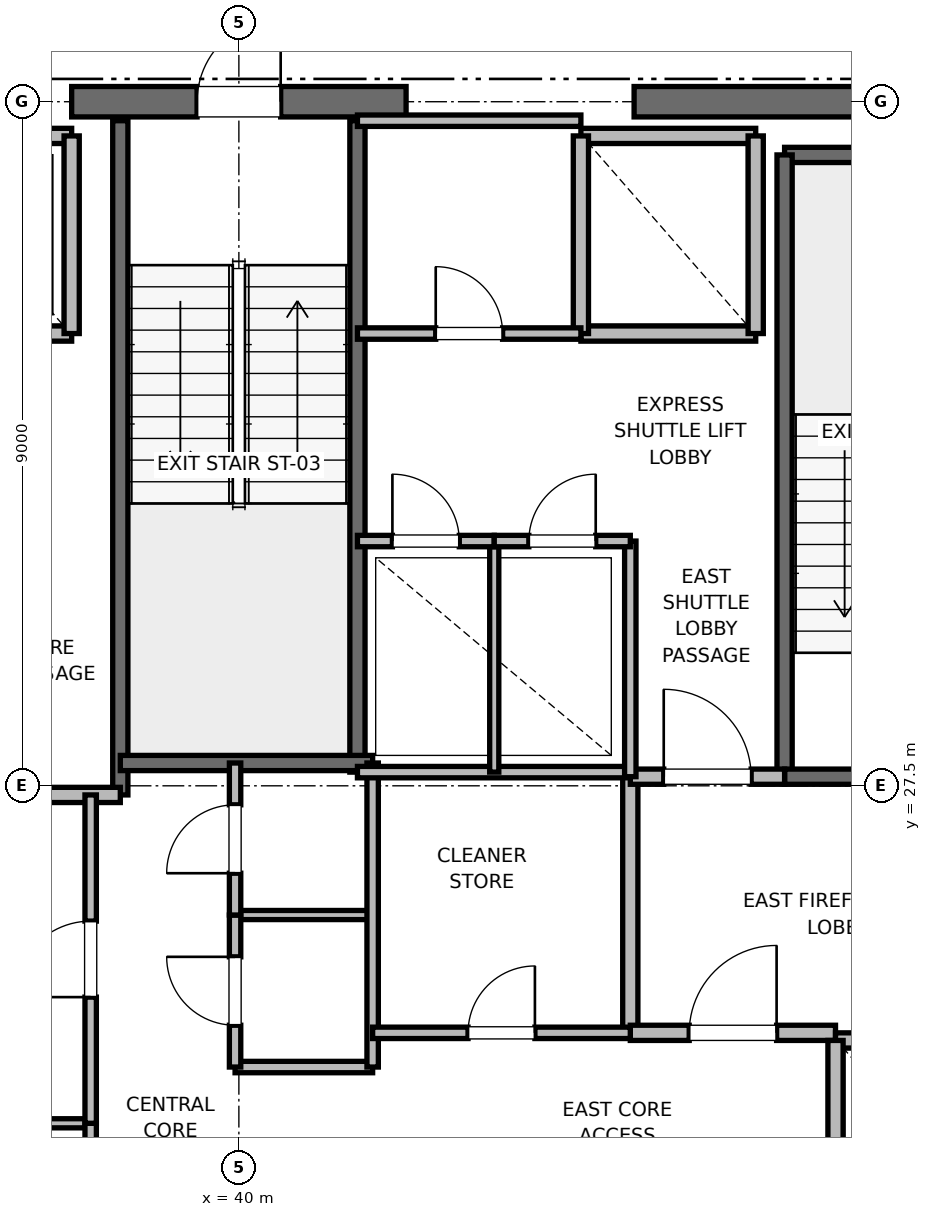
"""IFC4 building model, lengths in metres.
Left out: names, types, materials, properties, quantities, classifications, styles, units other than length and angle.
Written with IfcOpenShell. Run it as: python <this file> out.ifc"""

import sys

from ifc_helpers import new_model, si_unit, direction, frame, frame_2d, origin, place, context, subcontext, project, spatial, rectangle, extrude, element, fill, save


model = new_model("IFC4")
c1 = context("Model", 3, precision=1e-05, world=origin(), true_north=direction((0.0, 1.0)))
c2 = subcontext(c1, "Body", "Model", "MODEL_VIEW")
j1 = project(units=[si_unit("LENGTHUNIT", "METRE"), si_unit("PLANEANGLEUNIT", "RADIAN")], contexts=[c1])
p1 = place(None, origin())
s1 = spatial("IfcSite", under=j1, at=p1, CompositionType="ELEMENT")
p2 = place(p1, origin())
s2 = spatial("IfcBuilding", under=s1, at=p2, CompositionType="ELEMENT")
p3 = place(p2, frame((0.0, 0.0, 338.8)))
s3 = spatial("IfcBuildingStorey", under=s2, at=p3, CompositionType="ELEMENT", Elevation=338.8)
p4 = place(p3, frame((37.8, 36.5, 0.0), z_axis=(0.0, 0.0, 1.0), x_axis=(1.0, 0.0, 0.0)))
e1 = element("IfcWall", 1, at=p4, inside=s3, PredefinedType="SHEAR", context=c2, shape_type="SweptSolid", body=[
    extrude(rectangle(XDim=4.4, YDim=0.4, at=frame_2d((2.2, 0.0))), origin(), (0.0, 0.0, 1.0), 3.7),
])
p5 = place(p4, frame((1.65, 0.0, 0.0)))
e2 = element("IfcOpeningElement", 2, at=p5, cuts=e1, PredefinedType="OPENING", context=c2, shape_type="SweptSolid", body=[
    extrude(rectangle(XDim=1.1, YDim=2.15, at=frame_2d((0.55, 1.075))), frame((0.0, 0.2, 0.0), z_axis=(0.0, -1.0, 0.0), x_axis=(1.0, 0.0, 0.0)), (0.0, 0.0, 1.0), 0.4),
])
p6 = place(p3, frame((45.2, 36.5, 0.0), z_axis=(0.0, 0.0, 1.0), x_axis=(1.0, 0.0, 0.0)))
e3 = element("IfcWall", 3, at=p6, inside=s3, PredefinedType="SHEAR", context=c2, shape_type="SweptSolid", body=[
    extrude(rectangle(XDim=5.8, YDim=0.4, at=frame_2d((2.9, 0.0))), origin(), (0.0, 0.0, 1.0), 3.7),
])
p7 = place(p3, frame((47.18, 35.8, 0.0), z_axis=(0.0, 0.0, 1.0), x_axis=(1.0, 0.0, 0.0)))
e4 = element("IfcWall", 4, at=p7, inside=s3, PredefinedType="SOLIDWALL", context=c2, shape_type="SweptSolid", body=[
    extrude(rectangle(XDim=3.12, YDim=0.2, at=frame_2d((1.56, 0.0))), origin(), (0.0, 0.0, 1.0), 3.7),
])
p8 = place(p3, frame((47.18, 27.62, 0.0), z_axis=(0.0, 0.0, 1.0), x_axis=(0.0, 1.0, 0.0)))
e5 = element("IfcWall", 5, at=p8, inside=s3, PredefinedType="SOLIDWALL", context=c2, shape_type="SweptSolid", body=[
    extrude(rectangle(XDim=8.18, YDim=0.2, at=frame_2d((4.09, 0.0))), origin(), (0.0, 0.0, 1.0), 3.7),
])
p9 = place(p3, frame((47.18, 27.62, 0.0), z_axis=(0.0, 0.0, 1.0), x_axis=(1.0, 0.0, 0.0)))
e6 = element("IfcWall", 6, at=p9, inside=s3, PredefinedType="SOLIDWALL", context=c2, shape_type="SweptSolid", body=[
    extrude(rectangle(XDim=3.12, YDim=0.2, at=frame_2d((1.56, 0.0))), origin(), (0.0, 0.0, 1.0), 3.7),
])
p10 = place(p9, frame((1.01, 0.0, 0.0)))
e7 = element("IfcOpeningElement", 7, at=p10, cuts=e6, PredefinedType="OPENING", context=c2, shape_type="SweptSolid", body=[
    extrude(rectangle(XDim=1.1, YDim=2.15, at=frame_2d((0.55, 1.075))), frame((0.0, 0.1, 0.0), z_axis=(0.0, -1.0, 0.0), x_axis=(1.0, 0.0, 0.0)), (0.0, 0.0, 1.0), 0.2),
])
p11 = place(p3, frame((38.44, 27.38, 0.0), z_axis=(0.0, 0.0, 1.0), x_axis=(0.0, 1.0, 0.0)))
e8 = element("IfcWall", 8, at=p11, inside=s3, PredefinedType="SOLIDWALL", context=c2, shape_type="SweptSolid", body=[
    extrude(rectangle(XDim=8.87, YDim=0.2, at=frame_2d((4.435, 0.0))), origin(), (0.0, 0.0, 1.0), 3.7),
])
p12 = place(p3, frame((41.56, 27.68, 0.0), z_axis=(0.0, 0.0, 1.0), x_axis=(0.0, 1.0, 0.0)))
e9 = element("IfcWall", 9, at=p12, inside=s3, PredefinedType="SOLIDWALL", context=c2, shape_type="SweptSolid", body=[
    extrude(rectangle(XDim=8.57, YDim=0.2, at=frame_2d((4.285, 0.0))), origin(), (0.0, 0.0, 1.0), 3.7),
])
p13 = place(p3, frame((38.44, 27.8, 0.0), z_axis=(0.0, 0.0, 1.0), x_axis=(1.0, 0.0, 0.0)))
e10 = element("IfcWall", 10, at=p13, inside=s3, PredefinedType="SOLIDWALL", context=c2, shape_type="SweptSolid", body=[
    extrude(rectangle(XDim=3.32, YDim=0.2, at=frame_2d((1.66, 0.0))), origin(), (0.0, 0.0, 1.0), 3.7),
])
p14 = place(p3, frame((32.82, 27.38, 0.0), z_axis=(0.0, 0.0, 1.0), x_axis=(1.0, 0.0, 0.0)))
e11 = element("IfcWall", 11, at=p14, inside=s3, PredefinedType="PARTITIONING", context=c2, shape_type="SweptSolid", body=[
    extrude(rectangle(XDim=5.62, YDim=0.2, at=frame_2d((2.81, 0.0))), origin(), (0.0, 0.0, 1.0), 3.7),
])
p15 = place(p3, frame((45.15, 24.25, 0.0), z_axis=(0.0, 0.0, 1.0), x_axis=(0.0, 1.0, 0.0)))
e12 = element("IfcWall", 12, at=p15, inside=s3, PredefinedType="PARTITIONING", context=c2, shape_type="SweptSolid", body=[
    extrude(rectangle(XDim=3.37, YDim=0.2, at=frame_2d((1.685, 0.0))), origin(), (0.0, 0.0, 1.0), 3.7),
])
p16 = place(p3, frame((45.15, 24.25, 0.0), z_axis=(0.0, 0.0, 1.0), x_axis=(1.0, 0.0, 0.0)))
e13 = element("IfcWall", 13, at=p16, inside=s3, PredefinedType="PARTITIONING", context=c2, shape_type="SweptSolid", body=[
    extrude(rectangle(XDim=2.7, YDim=0.2, at=frame_2d((1.35, 0.0))), origin(), (0.0, 0.0, 1.0), 3.7),
])
p17 = place(p16, frame((0.775, 0.0, 0.0)))
e14 = element("IfcOpeningElement", 14, at=p17, cuts=e13, PredefinedType="OPENING", context=c2, shape_type="SweptSolid", body=[
    extrude(rectangle(XDim=1.15, YDim=2.2, at=frame_2d((0.575, 1.1))), frame((0.0, 0.1, 0.0), z_axis=(0.0, -1.0, 0.0), x_axis=(1.0, 0.0, 0.0)), (0.0, 0.0, 1.0), 0.2),
])
p18 = place(p3, frame((45.15, 27.62, 0.0), z_axis=(0.0, 0.0, 1.0), x_axis=(1.0, 0.0, 0.0)))
e15 = element("IfcWall", 15, at=p18, inside=s3, PredefinedType="PARTITIONING", context=c2, shape_type="SweptSolid", body=[
    extrude(rectangle(XDim=2.03, YDim=0.2, at=frame_2d((1.015, 0.0))), origin(), (0.0, 0.0, 1.0), 3.7),
])
p19 = place(p18, frame((0.44, 0.0, 0.0)))
e16 = element("IfcOpeningElement", 16, at=p19, cuts=e15, PredefinedType="OPENING", context=c2, shape_type="SweptSolid", body=[
    extrude(rectangle(XDim=1.15, YDim=2.2, at=frame_2d((0.575, 1.1))), frame((0.0, 0.1, 0.0), z_axis=(0.0, -1.0, 0.0), x_axis=(1.0, 0.0, 0.0)), (0.0, 0.0, 1.0), 0.2),
])
p20 = place(p3, frame((50.45, 24.15, 0.0), z_axis=(0.0, 0.0, 1.0), x_axis=(-1.0, 0.0, 0.0)))
e17 = element("IfcWall", 17, at=p20, inside=s3, PredefinedType="SOLIDWALL", context=c2, shape_type="SweptSolid", body=[
    extrude(rectangle(XDim=2.6, YDim=0.2, at=frame_2d((1.3, 0.0))), origin(), (0.0, 0.0, 1.0), 2.78),
])
p21 = place(p20, frame((0.75, 0.0, 0.0)))
e18 = element("IfcOpeningElement", 18, at=p21, cuts=e17, PredefinedType="OPENING", context=c2, shape_type="SweptSolid", body=[
    extrude(rectangle(XDim=1.1, YDim=2.2, at=frame_2d((0.55, 1.1))), frame((0.0, 0.1, 0.0), z_axis=(0.0, -1.0, 0.0), x_axis=(1.0, 0.0, 0.0)), (0.0, 0.0, 1.0), 0.2),
])
p22 = place(p3, frame((47.85, 24.15, 0.0), z_axis=(0.0, 0.0, 1.0), x_axis=(0.0, -1.0, 0.0)))
e19 = element("IfcWall", 19, at=p22, inside=s3, PredefinedType="SOLIDWALL", context=c2, shape_type="SweptSolid", body=[
    extrude(rectangle(XDim=3.0, YDim=0.2, at=frame_2d((1.5, 0.0))), origin(), (0.0, 0.0, 1.0), 3.7),
])
p23 = place(p3, frame((35.5, 33.45, 0.0), z_axis=(0.0, 0.0, 1.0), x_axis=(1.0, 0.0, 0.0)))
e20 = element("IfcWall", 20, at=p23, inside=s3, PredefinedType="SOLIDWALL", context=c2, shape_type="SweptSolid", body=[
    extrude(rectangle(XDim=2.3, YDim=0.2, at=frame_2d((1.15, 0.0))), origin(), (0.0, 0.0, 1.0), 3.7),
])
p24 = place(p23, frame((0.6, 0.0, 0.0)))
e21 = element("IfcOpeningElement", 21, at=p24, cuts=e20, PredefinedType="OPENING", context=c2, shape_type="SweptSolid", body=[
    extrude(rectangle(XDim=1.1, YDim=2.2, at=frame_2d((0.55, 1.1))), frame((0.0, 0.1, 0.0), z_axis=(0.0, -1.0, 0.0), x_axis=(1.0, 0.0, 0.0)), (0.0, 0.0, 1.0), 0.2),
])
p25 = place(p3, frame((37.8, 36.05, 0.0), z_axis=(0.0, 0.0, 1.0), x_axis=(-1.0, 0.0, 0.0)))
e22 = element("IfcWall", 22, at=p25, inside=s3, PredefinedType="SOLIDWALL", context=c2, shape_type="SweptSolid", body=[
    extrude(rectangle(XDim=2.3, YDim=0.2, at=frame_2d((1.15, 0.0))), origin(), (0.0, 0.0, 1.0), 2.78),
])
p26 = place(p3, frame((37.8, 33.45, 0.0), z_axis=(0.0, 0.0, 1.0), x_axis=(0.0, 1.0, 0.0)))
e23 = element("IfcWall", 23, at=p26, inside=s3, PredefinedType="SOLIDWALL", context=c2, shape_type="SweptSolid", body=[
    extrude(rectangle(XDim=2.6, YDim=0.2, at=frame_2d((1.3, 0.0))), origin(), (0.0, 0.0, 1.0), 2.78),
])
p27 = place(p3, frame((44.5, 33.45, 0.0), z_axis=(0.0, 0.0, 1.0), x_axis=(1.0, 0.0, 0.0)))
e24 = element("IfcWall", 24, at=p27, inside=s3, PredefinedType="SOLIDWALL", context=c2, shape_type="SweptSolid", body=[
    extrude(rectangle(XDim=2.3, YDim=0.2, at=frame_2d((1.15, 0.0))), origin(), (0.0, 0.0, 1.0), 3.7),
])
p28 = place(p3, frame((46.8, 36.05, 0.0), z_axis=(0.0, 0.0, 1.0), x_axis=(-1.0, 0.0, 0.0)))
e25 = element("IfcWall", 25, at=p28, inside=s3, PredefinedType="SOLIDWALL", context=c2, shape_type="SweptSolid", body=[
    extrude(rectangle(XDim=2.3, YDim=0.2, at=frame_2d((1.15, 0.0))), origin(), (0.0, 0.0, 1.0), 2.78),
])
p29 = place(p3, frame((44.5, 36.05, 0.0), z_axis=(0.0, 0.0, 1.0), x_axis=(0.0, -1.0, 0.0)))
e26 = element("IfcWall", 26, at=p29, inside=s3, PredefinedType="SOLIDWALL", context=c2, shape_type="SweptSolid", body=[
    extrude(rectangle(XDim=2.6, YDim=0.2, at=frame_2d((1.3, 0.0))), origin(), (0.0, 0.0, 1.0), 2.78),
])
p30 = place(p3, frame((46.8, 33.45, 0.0), z_axis=(0.0, 0.0, 1.0), x_axis=(0.0, 1.0, 0.0)))
e27 = element("IfcWall", 27, at=p30, inside=s3, PredefinedType="SOLIDWALL", context=c2, shape_type="SweptSolid", body=[
    extrude(rectangle(XDim=2.6, YDim=0.2, at=frame_2d((1.3, 0.0))), origin(), (0.0, 0.0, 1.0), 3.7),
])
p31 = place(p3, frame((39.95, 23.8, 0.0), z_axis=(0.0, 0.0, 1.0), x_axis=(1.0, 0.0, 0.0)))
e28 = element("IfcWall", 28, at=p31, inside=s3, PredefinedType="PARTITIONING", context=c2, shape_type="SweptSolid", body=[
    extrude(rectangle(XDim=1.81, YDim=0.15, at=frame_2d((0.905, 0.0))), origin(), (0.0, 0.0, 1.0), 2.85),
])
p32 = place(p3, frame((39.95, 25.8, 0.0), z_axis=(0.0, 0.0, 1.0), x_axis=(1.0, 0.0, 0.0)))
e29 = element("IfcWall", 29, at=p32, inside=s3, PredefinedType="PARTITIONING", context=c2, shape_type="SweptSolid", body=[
    extrude(rectangle(XDim=1.81, YDim=0.12, at=frame_2d((0.905, 0.0))), origin(), (0.0, 0.0, 1.0), 2.85),
])
p33 = place(p3, frame((41.76, 23.8, 0.0), z_axis=(0.0, 0.0, 1.0), x_axis=(0.0, 1.0, 0.0)))
e30 = element("IfcWall", 30, at=p33, inside=s3, PredefinedType="PARTITIONING", context=c2, shape_type="SweptSolid", body=[
    extrude(rectangle(XDim=4.0, YDim=0.15, at=frame_2d((2.0, 0.0))), origin(), (0.0, 0.0, 1.0), 2.85),
])
p34 = place(p3, frame((39.95, 23.8, 0.0), z_axis=(0.0, 0.0, 1.0), x_axis=(0.0, 1.0, 0.0)))
e31 = element("IfcWall", 31, at=p34, inside=s3, PredefinedType="PARTITIONING", context=c2, shape_type="SweptSolid", body=[
    extrude(rectangle(XDim=2.0, YDim=0.15, at=frame_2d((1.0, 0.0))), origin(), (0.0, 0.0, 1.0), 2.85),
])
p35 = place(p34, frame((0.55, 0.0, 0.0)))
e32 = element("IfcOpeningElement", 32, at=p35, cuts=e31, PredefinedType="OPENING", context=c2, shape_type="SweptSolid", body=[
    extrude(rectangle(XDim=0.9, YDim=2.1, at=frame_2d((0.45, 1.05))), frame((0.0, 0.075, 0.0), z_axis=(0.0, -1.0, 0.0), x_axis=(1.0, 0.0, 0.0)), (0.0, 0.0, 1.0), 0.15),
])
p36 = place(p3, frame((39.95, 25.8, 0.0), z_axis=(0.0, 0.0, 1.0), x_axis=(0.0, 1.0, 0.0)))
e33 = element("IfcWall", 33, at=p36, inside=s3, PredefinedType="PARTITIONING", context=c2, shape_type="SweptSolid", body=[
    extrude(rectangle(XDim=2.0, YDim=0.15, at=frame_2d((1.0, 0.0))), origin(), (0.0, 0.0, 1.0), 2.85),
])
p37 = place(p36, frame((0.55, 0.0, 0.0)))
e34 = element("IfcOpeningElement", 34, at=p37, cuts=e33, PredefinedType="OPENING", context=c2, shape_type="SweptSolid", body=[
    extrude(rectangle(XDim=0.9, YDim=2.1, at=frame_2d((0.45, 1.05))), frame((0.0, 0.075, 0.0), z_axis=(0.0, -1.0, 0.0), x_axis=(1.0, 0.0, 0.0)), (0.0, 0.0, 1.0), 0.15),
])
p38 = place(p3, frame((32.82, 23.06, 0.0), z_axis=(0.0, 0.0, 1.0), x_axis=(1.0, 0.0, 0.0)))
e35 = element("IfcWall", 35, at=p38, inside=s3, PredefinedType="PARTITIONING", context=c2, shape_type="SweptSolid", body=[
    extrude(rectangle(XDim=5.23, YDim=0.12, at=frame_2d((2.615, 0.0))), origin(), (0.0, 0.0, 1.0), 2.85),
])
p39 = place(p3, frame((38.05, 18.6, 0.0), z_axis=(0.0, 0.0, 1.0), x_axis=(0.0, 1.0, 0.0)))
e36 = element("IfcWall", 36, at=p39, inside=s3, PredefinedType="PARTITIONING", context=c2, shape_type="SweptSolid", body=[
    extrude(rectangle(XDim=4.46, YDim=0.15, at=frame_2d((2.23, 0.0))), origin(), (0.0, 0.0, 1.0), 2.78),
])
p40 = place(p39, frame((1.73, 0.0, 0.0)))
e37 = element("IfcOpeningElement", 37, at=p40, cuts=e36, PredefinedType="OPENING", context=c2, shape_type="SweptSolid", body=[
    extrude(rectangle(XDim=1.0, YDim=2.15, at=frame_2d((0.5, 1.075))), frame((0.0, 0.075, 0.0), z_axis=(0.0, -1.0, 0.0), x_axis=(1.0, 0.0, 0.0)), (0.0, 0.0, 1.0), 0.15),
])
p41 = place(p3, frame((38.05, 23.06, 0.0), z_axis=(0.0, 0.0, 1.0), x_axis=(0.0, 1.0, 0.0)))
e38 = element("IfcWall", 38, at=p41, inside=s3, PredefinedType="PARTITIONING", context=c2, shape_type="SweptSolid", body=[
    extrude(rectangle(XDim=4.32, YDim=0.15, at=frame_2d((2.16, 0.0))), origin(), (0.0, 0.0, 1.0), 2.85),
])
p42 = place(p41, frame((1.66, 0.0, 0.0)))
e39 = element("IfcOpeningElement", 39, at=p42, cuts=e38, PredefinedType="OPENING", context=c2, shape_type="SweptSolid", body=[
    extrude(rectangle(XDim=1.0, YDim=2.15, at=frame_2d((0.5, 1.075))), frame((0.0, 0.075, 0.0), z_axis=(0.0, -1.0, 0.0), x_axis=(1.0, 0.0, 0.0)), (0.0, 0.0, 1.0), 0.15),
])
p43 = place(p3, frame((41.56, 27.68, 0.0), z_axis=(0.0, 0.0, 1.0), x_axis=(1.0, 0.0, 0.0)))
e40 = element("IfcWall", 40, at=p43, inside=s3, PredefinedType="PARTITIONING", context=c2, shape_type="SweptSolid", body=[
    extrude(rectangle(XDim=3.59, YDim=0.15, at=frame_2d((1.795, 0.0))), origin(), (0.0, 0.0, 1.0), 2.85),
])
p44 = place(p3, frame((41.76, 24.25, 0.0), z_axis=(0.0, 0.0, 1.0), x_axis=(1.0, 0.0, 0.0)))
e41 = element("IfcWall", 41, at=p44, inside=s3, PredefinedType="PARTITIONING", context=c2, shape_type="SweptSolid", body=[
    extrude(rectangle(XDim=3.39, YDim=0.15, at=frame_2d((1.695, 0.0))), origin(), (0.0, 0.0, 1.0), 2.85),
])
p45 = place(p44, frame((1.255, 0.0, 0.0)))
e42 = element("IfcOpeningElement", 42, at=p45, cuts=e41, PredefinedType="OPENING", context=c2, shape_type="SweptSolid", body=[
    extrude(rectangle(XDim=0.88, YDim=2.1, at=frame_2d((0.44, 1.05))), frame((0.0, 0.075, 0.0), z_axis=(0.0, -1.0, 0.0), x_axis=(1.0, 0.0, 0.0)), (0.0, 0.0, 1.0), 0.15),
])
p46 = place(p3, frame((45.15, 27.62, 0.0), z_axis=(0.0, 0.0, 1.0), x_axis=(0.0, 1.0, 0.0)))
e43 = element("IfcWall", 43, at=p46, inside=s3, PredefinedType="PARTITIONING", context=c2, shape_type="SweptSolid", body=[
    extrude(rectangle(XDim=3.1, YDim=0.15, at=frame_2d((1.55, 0.0))), origin(), (0.0, 0.0, 1.0), 2.85),
])
p47 = place(p3, frame((43.36, 27.68, 0.0), z_axis=(0.0, 0.0, 1.0), x_axis=(0.0, 1.0, 0.0)))
e44 = element("IfcWall", 44, at=p47, inside=s3, PredefinedType="PARTITIONING", context=c2, shape_type="SweptSolid", body=[
    extrude(rectangle(XDim=3.04, YDim=0.12, at=frame_2d((1.52, 0.0))), origin(), (0.0, 0.0, 1.0), 2.85),
])
p48 = place(p3, frame((41.56, 30.72, 0.0), z_axis=(0.0, 0.0, 1.0), x_axis=(1.0, 0.0, 0.0)))
e45 = element("IfcWall", 45, at=p48, inside=s3, PredefinedType="PARTITIONING", context=c2, shape_type="SweptSolid", body=[
    extrude(rectangle(XDim=1.8, YDim=0.15, at=frame_2d((0.9, 0.0))), origin(), (0.0, 0.0, 1.0), 2.85),
])
p49 = place(p48, frame((0.46, 0.0, 0.0)))
e46 = element("IfcOpeningElement", 46, at=p49, cuts=e45, PredefinedType="OPENING", context=c2, shape_type="SweptSolid", body=[
    extrude(rectangle(XDim=0.88, YDim=2.1, at=frame_2d((0.44, 1.05))), frame((0.0, 0.075, 0.0), z_axis=(0.0, -1.0, 0.0), x_axis=(1.0, 0.0, 0.0)), (0.0, 0.0, 1.0), 0.15),
])
p50 = place(p3, frame((43.36, 30.72, 0.0), z_axis=(0.0, 0.0, 1.0), x_axis=(1.0, 0.0, 0.0)))
e47 = element("IfcWall", 47, at=p50, inside=s3, PredefinedType="PARTITIONING", context=c2, shape_type="SweptSolid", body=[
    extrude(rectangle(XDim=1.79, YDim=0.15, at=frame_2d((0.895, 0.0))), origin(), (0.0, 0.0, 1.0), 2.85),
])
p51 = place(p50, frame((0.455, 0.0, 0.0)))
e48 = element("IfcOpeningElement", 48, at=p51, cuts=e47, PredefinedType="OPENING", context=c2, shape_type="SweptSolid", body=[
    extrude(rectangle(XDim=0.88, YDim=2.1, at=frame_2d((0.44, 1.05))), frame((0.0, 0.075, 0.0), z_axis=(0.0, -1.0, 0.0), x_axis=(1.0, 0.0, 0.0)), (0.0, 0.0, 1.0), 0.15),
])
p52 = place(p3, frame((41.56, 36.25, 0.0), z_axis=(0.0, 0.0, 1.0), x_axis=(1.0, 0.0, 0.0)))
e49 = element("IfcWall", 49, at=p52, inside=s3, PredefinedType="PARTITIONING", context=c2, shape_type="SweptSolid", body=[
    extrude(rectangle(XDim=2.94, YDim=0.15, at=frame_2d((1.47, 0.0))), origin(), (0.0, 0.0, 1.0), 2.78),
])
p53 = place(p3, frame((41.56, 33.45, 0.0), z_axis=(0.0, 0.0, 1.0), x_axis=(1.0, 0.0, 0.0)))
e50 = element("IfcWall", 50, at=p53, inside=s3, PredefinedType="PARTITIONING", context=c2, shape_type="SweptSolid", body=[
    extrude(rectangle(XDim=2.94, YDim=0.15, at=frame_2d((1.47, 0.0))), origin(), (0.0, 0.0, 1.0), 2.85),
])
p54 = place(p53, frame((1.03, 0.0, 0.0)))
e51 = element("IfcOpeningElement", 51, at=p54, cuts=e50, PredefinedType="OPENING", context=c2, shape_type="SweptSolid", body=[
    extrude(rectangle(XDim=0.88, YDim=2.1, at=frame_2d((0.44, 1.05))), frame((0.0, 0.075, 0.0), z_axis=(0.0, -1.0, 0.0), x_axis=(1.0, 0.0, 0.0)), (0.0, 0.0, 1.0), 0.15),
])
p55 = place(p5, origin())
e52 = element("IfcDoor", 52, at=p55, inside=s3, OperationType="SINGLE_SWING_RIGHT", PredefinedType="DOOR", context=c2, shape_type="SweptSolid", body=[
    extrude(rectangle(XDim=1.1, YDim=2.15, at=frame_2d((0.55, 1.075))), frame((0.0, 0.025, 0.0), z_axis=(0.0, -1.0, 0.0), x_axis=(1.0, 0.0, 0.0)), (0.0, 0.0, 1.0), 0.05),
])
fill(e2, e52)
p56 = place(p17, origin())
e53 = element("IfcDoor", 53, at=p56, inside=s3, OperationType="SINGLE_SWING_RIGHT", PredefinedType="DOOR", context=c2, shape_type="SweptSolid", body=[
    extrude(rectangle(XDim=1.15, YDim=2.2, at=frame_2d((0.575, 1.1))), frame((0.0, 0.025, 0.0), z_axis=(0.0, -1.0, 0.0), x_axis=(1.0, 0.0, 0.0)), (0.0, 0.0, 1.0), 0.05),
])
fill(e14, e53)
p57 = place(p19, origin())
e54 = element("IfcDoor", 54, at=p57, inside=s3, OperationType="SINGLE_SWING_LEFT", PredefinedType="DOOR", context=c2, shape_type="SweptSolid", body=[
    extrude(rectangle(XDim=1.15, YDim=2.2, at=frame_2d((0.575, 1.1))), frame((0.0, 0.025, 0.0), z_axis=(0.0, -1.0, 0.0), x_axis=(1.0, 0.0, 0.0)), (0.0, 0.0, 1.0), 0.05),
])
fill(e16, e54)
p58 = place(p35, origin())
e55 = element("IfcDoor", 55, at=p58, inside=s3, OperationType="SINGLE_SWING_RIGHT", PredefinedType="DOOR", context=c2, shape_type="SweptSolid", body=[
    extrude(rectangle(XDim=0.9, YDim=2.1, at=frame_2d((0.45, 1.05))), frame((0.0, 0.025, 0.0), z_axis=(0.0, -1.0, 0.0), x_axis=(1.0, 0.0, 0.0)), (0.0, 0.0, 1.0), 0.05),
])
fill(e32, e55)
p59 = place(p37, origin())
e56 = element("IfcDoor", 56, at=p59, inside=s3, OperationType="SINGLE_SWING_LEFT", PredefinedType="DOOR", context=c2, shape_type="SweptSolid", body=[
    extrude(rectangle(XDim=0.9, YDim=2.1, at=frame_2d((0.45, 1.05))), frame((0.0, 0.025, 0.0), z_axis=(0.0, -1.0, 0.0), x_axis=(1.0, 0.0, 0.0)), (0.0, 0.0, 1.0), 0.05),
])
fill(e34, e56)
p60 = place(p42, origin())
e57 = element("IfcDoor", 57, at=p60, inside=s3, OperationType="SINGLE_SWING_LEFT", PredefinedType="DOOR", context=c2, shape_type="SweptSolid", body=[
    extrude(rectangle(XDim=1.0, YDim=2.15, at=frame_2d((0.5, 1.075))), frame((0.0, 0.025, 0.0), z_axis=(0.0, -1.0, 0.0), x_axis=(1.0, 0.0, 0.0)), (0.0, 0.0, 1.0), 0.05),
])
fill(e39, e57)
p61 = place(p45, origin())
e58 = element("IfcDoor", 58, at=p61, inside=s3, OperationType="SINGLE_SWING_RIGHT", PredefinedType="DOOR", context=c2, shape_type="SweptSolid", body=[
    extrude(rectangle(XDim=0.88, YDim=2.1, at=frame_2d((0.44, 1.05))), frame((0.0, 0.025, 0.0), z_axis=(0.0, -1.0, 0.0), x_axis=(1.0, 0.0, 0.0)), (0.0, 0.0, 1.0), 0.05),
])
fill(e42, e58)
p62 = place(p49, origin())
e59 = element("IfcDoor", 59, at=p62, inside=s3, OperationType="SINGLE_SWING_LEFT", PredefinedType="DOOR", context=c2, shape_type="SweptSolid", body=[
    extrude(rectangle(XDim=0.88, YDim=2.1, at=frame_2d((0.44, 1.05))), frame((0.0, 0.025, 0.0), z_axis=(0.0, -1.0, 0.0), x_axis=(1.0, 0.0, 0.0)), (0.0, 0.0, 1.0), 0.05),
])
fill(e46, e59)
p63 = place(p51, origin())
e60 = element("IfcDoor", 60, at=p63, inside=s3, OperationType="SINGLE_SWING_RIGHT", PredefinedType="DOOR", context=c2, shape_type="SweptSolid", body=[
    extrude(rectangle(XDim=0.88, YDim=2.1, at=frame_2d((0.44, 1.05))), frame((0.0, 0.025, 0.0), z_axis=(0.0, -1.0, 0.0), x_axis=(1.0, 0.0, 0.0)), (0.0, 0.0, 1.0), 0.05),
])
fill(e48, e60)
p64 = place(p54, origin())
e61 = element("IfcDoor", 61, at=p64, inside=s3, OperationType="SINGLE_SWING_LEFT", PredefinedType="DOOR", context=c2, shape_type="SweptSolid", body=[
    extrude(rectangle(XDim=0.88, YDim=2.1, at=frame_2d((0.44, 1.05))), frame((0.0, 0.025, 0.0), z_axis=(0.0, -1.0, 0.0), x_axis=(1.0, 0.0, 0.0)), (0.0, 0.0, 1.0), 0.05),
])
fill(e51, e61)
save(model, sys.argv[1])
